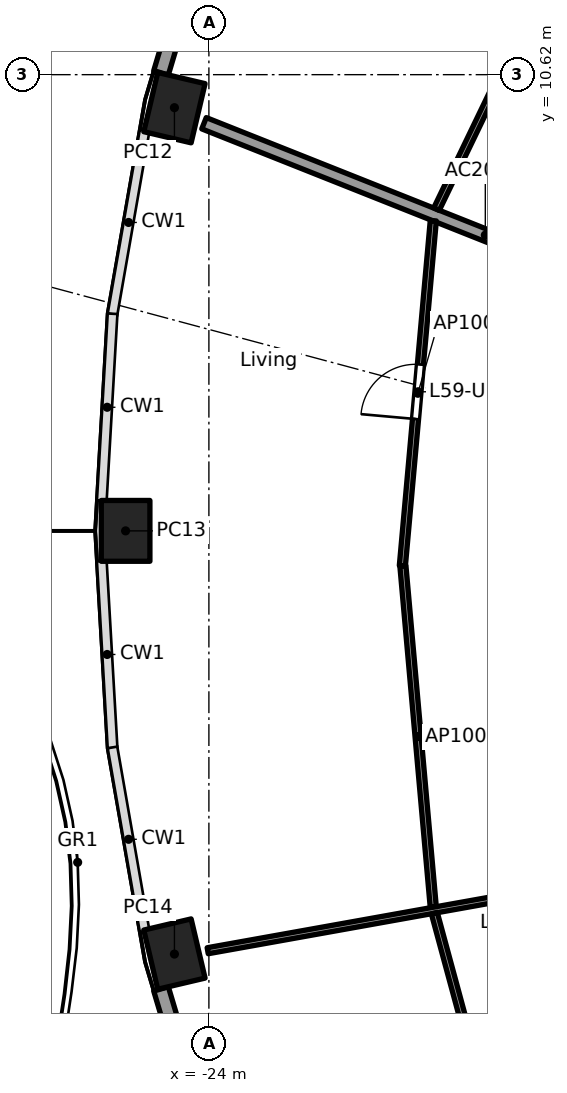
"""IFC4 building model, lengths in metres.
Left out: names, types, materials, properties, quantities, classifications, styles, units other than length and angle.
Written with IfcOpenShell. Run it as: python <this file> out.ifc"""

import sys

from ifc_helpers import new_model, si_unit, direction, frame, frame_2d, origin, origin_2d, place, context, subcontext, project, spatial, rectangle, hollow_rectangle, extrude, element, fill, save


model = new_model("IFC4")
c1 = context("Model", 3, precision=1e-05, world=origin(), true_north=direction((0.0, 1.0)))
c2 = subcontext(c1, "Body", "Model", "MODEL_VIEW")
j1 = project(units=[si_unit("LENGTHUNIT", "METRE"), si_unit("PLANEANGLEUNIT", "RADIAN")], contexts=[c1])
p1 = place(None, origin())
s1 = spatial("IfcSite", under=j1, at=p1, CompositionType="ELEMENT")
p2 = place(p1, origin())
s2 = spatial("IfcBuilding", under=s1, at=p2, CompositionType="ELEMENT")
p3 = place(p2, frame((0.0, 0.0, 234.4)))
s3 = spatial("IfcBuildingStorey", under=s2, at=p3, CompositionType="ELEMENT", Elevation=234.4)
for number, where, z_axis, x_axis in (
    (1, (-24.567, 10.077, 0.0), (0.0, 0.0, 1.0), (-0.229, -0.973, 0.0)),
    (2, (-25.37, 3.118, 0.0), (0.0, 0.0, 1.0), (0.0, -1.0, 0.0)),
    (3, (-24.567, -3.842, 0.0), (0.0, 0.0, 1.0), (0.229, -0.973, 0.0)),
):
    element("IfcColumn", number, at=place(p3, frame(where, z_axis=z_axis, x_axis=x_axis)), inside=s3, PredefinedType="COLUMN", context=c2, shape_type="SweptSolid", body=[
        extrude(hollow_rectangle(XDim=1.0, YDim=0.8, WallThickness=0.032, at=origin_2d()), origin(), (0.0, 0.0, 1.0), 3.7),
    ])
p4 = place(p3, frame((-24.787, 10.65, 0.0), z_axis=(0.0, 0.0, 1.0), x_axis=(0.285859454825, 0.95827155446, 0.0)))
e4 = element("IfcWall", 4, at=p4, inside=s3, PredefinedType="SOLIDWALL", context=c2, shape_type="SweptSolid", body=[
    extrude(rectangle(XDim=3.041, YDim=0.25, at=frame_2d((1.52, 0.0))), origin(), (0.0, 0.0, 1.0), 3.44),
])
p5 = place(p4, frame((0.47, 0.0, 0.0)))
e5 = element("IfcOpeningElement", 5, at=p5, cuts=e4, PredefinedType="OPENING", context=c2, shape_type="SweptSolid", body=[
    extrude(rectangle(XDim=2.1, YDim=2.4, at=frame_2d((1.05, 1.2))), frame((0.0, 0.135, 0.0), z_axis=(0.0, -1.0, 0.0), x_axis=(1.0, 0.0, 0.0)), (0.0, 0.0, 1.0), 0.27),
])
p6 = place(p3, frame((-23.918, -7.328, 0.0), z_axis=(0.0, 0.0, 1.0), x_axis=(-0.285859454825, 0.95827155446, 0.0)))
e6 = element("IfcWall", 6, at=p6, inside=s3, PredefinedType="SOLIDWALL", context=c2, shape_type="SweptSolid", body=[
    extrude(rectangle(XDim=3.041, YDim=0.25, at=frame_2d((1.52, 0.0))), origin(), (0.0, 0.0, 1.0), 3.44),
])
p7 = place(p6, frame((0.47, 0.0, 0.0)))
e7 = element("IfcOpeningElement", 7, at=p7, cuts=e6, PredefinedType="OPENING", context=c2, shape_type="SweptSolid", body=[
    extrude(rectangle(XDim=2.1, YDim=2.4, at=frame_2d((1.05, 1.2))), frame((0.0, 0.135, 0.0), z_axis=(0.0, -1.0, 0.0), x_axis=(1.0, 0.0, 0.0)), (0.0, 0.0, 1.0), 0.27),
])
p8 = place(p3, frame((-14.829, 6.141, 0.0), z_axis=(0.0, 0.0, 1.0), x_axis=(-0.929202069098, 0.36957206981, 0.0)))
e8 = element("IfcWall", 8, at=p8, inside=s3, PredefinedType="PARTITIONING", context=c2, shape_type="SweptSolid", body=[
    extrude(rectangle(XDim=9.957, YDim=0.2, at=frame_2d((4.978, 0.0))), origin(), (0.0, 0.0, 1.0), 2.837),
])
p9 = place(p3, frame((-17.904, 13.289, 0.0), z_axis=(0.0, 0.0, 1.0), x_axis=(-0.43429918566, -0.900768681369, 0.0)))
e9 = element("IfcWall", 9, at=p9, inside=s3, PredefinedType="PARTITIONING", context=c2, shape_type="SweptSolid", body=[
    extrude(rectangle(XDim=5.418, YDim=0.1, at=frame_2d((2.709, 0.0))), origin(), (0.0, 0.0, 1.0), 2.837),
])
p10 = place(p3, frame((-20.31, 8.218, 0.0), z_axis=(0.0, 0.0, 1.0), x_axis=(-0.089284106956, -0.996006198899, 0.0)))
e10 = element("IfcWall", 10, at=p10, inside=s3, PredefinedType="PARTITIONING", context=c2, shape_type="SweptSolid", body=[
    extrude(rectangle(XDim=5.698, YDim=0.1, at=frame_2d((2.849, 0.0))), origin(), (0.0, 0.0, 1.0), 2.837),
])
p11 = place(p10, frame((2.374, 0.0, 0.0)))
e11 = element("IfcOpeningElement", 11, at=p11, cuts=e10, PredefinedType="OPENING", context=c2, shape_type="SweptSolid", body=[
    extrude(rectangle(XDim=0.9, YDim=2.1, at=frame_2d((0.45, 1.05))), frame((0.0, 0.06, 0.0), z_axis=(0.0, -1.0, 0.0), x_axis=(1.0, 0.0, 0.0)), (0.0, 0.0, 1.0), 0.12),
])
p12 = place(p3, frame((-20.81, 2.542, 0.0), z_axis=(0.0, 0.0, 1.0), x_axis=(0.088621920298, -0.996065336834, 0.0)))
e12 = element("IfcWall", 12, at=p12, inside=s3, PredefinedType="PARTITIONING", context=c2, shape_type="SweptSolid", body=[
    extrude(rectangle(XDim=5.636, YDim=0.1, at=frame_2d((2.818, 0.0))), origin(), (0.0, 0.0, 1.0), 2.837),
])
p13 = place(p3, frame((-12.663, -1.752, 0.0), z_axis=(0.0, 0.0, 1.0), x_axis=(-0.98433012022, -0.176335516635, 0.0)))
e13 = element("IfcWall", 13, at=p13, inside=s3, PredefinedType="PARTITIONING", context=c2, shape_type="SweptSolid", body=[
    extrude(rectangle(XDim=11.537, YDim=0.1, at=frame_2d((5.769, 0.0))), origin(), (0.0, 0.0, 1.0), 2.762),
])
p14 = place(p13, frame((5.285, 0.0, 0.0)))
e14 = element("IfcOpeningElement", 14, at=p14, cuts=e13, PredefinedType="OPENING", context=c2, shape_type="SweptSolid", body=[
    extrude(rectangle(XDim=0.9, YDim=2.1, at=frame_2d((0.45, 1.05))), frame((0.0, 0.06, 0.0), z_axis=(0.0, -1.0, 0.0), x_axis=(1.0, 0.0, 0.0)), (0.0, 0.0, 1.0), 0.12),
])
p15 = place(p3, frame((-20.292, -3.17, 0.0), z_axis=(0.0, 0.0, 1.0), x_axis=(0.261890541964, -0.965097582646, 0.0)))
e15 = element("IfcWall", 15, at=p15, inside=s3, PredefinedType="PARTITIONING", context=c2, shape_type="SweptSolid", body=[
    extrude(rectangle(XDim=5.406, YDim=0.1, at=frame_2d((2.703, 0.0))), origin(), (0.0, 0.0, 1.0), 2.837),
])
p16 = place(p15, frame((2.253, 0.0, 0.0)))
e16 = element("IfcOpeningElement", 16, at=p16, cuts=e15, PredefinedType="OPENING", context=c2, shape_type="SweptSolid", body=[
    extrude(rectangle(XDim=0.9, YDim=2.1, at=frame_2d((0.45, 1.05))), frame((0.0, 0.06, 0.0), z_axis=(0.0, -1.0, 0.0), x_axis=(1.0, 0.0, 0.0)), (0.0, 0.0, 1.0), 0.12),
])
p17 = place(p11, frame((0.9, 0.0, 0.0), x_axis=(-1.0, 0.0, 0.0)))
e17 = element("IfcDoor", 17, at=p17, inside=s3, OperationType="SINGLE_SWING_LEFT", PredefinedType="DOOR", context=c2, shape_type="SweptSolid", body=[
    extrude(rectangle(XDim=0.9, YDim=2.1, at=frame_2d((0.45, 1.05))), frame((0.0, 0.025, 0.0), z_axis=(0.0, -1.0, 0.0), x_axis=(1.0, 0.0, 0.0)), (0.0, 0.0, 1.0), 0.05),
])
fill(e11, e17)
save(model, sys.argv[1])
